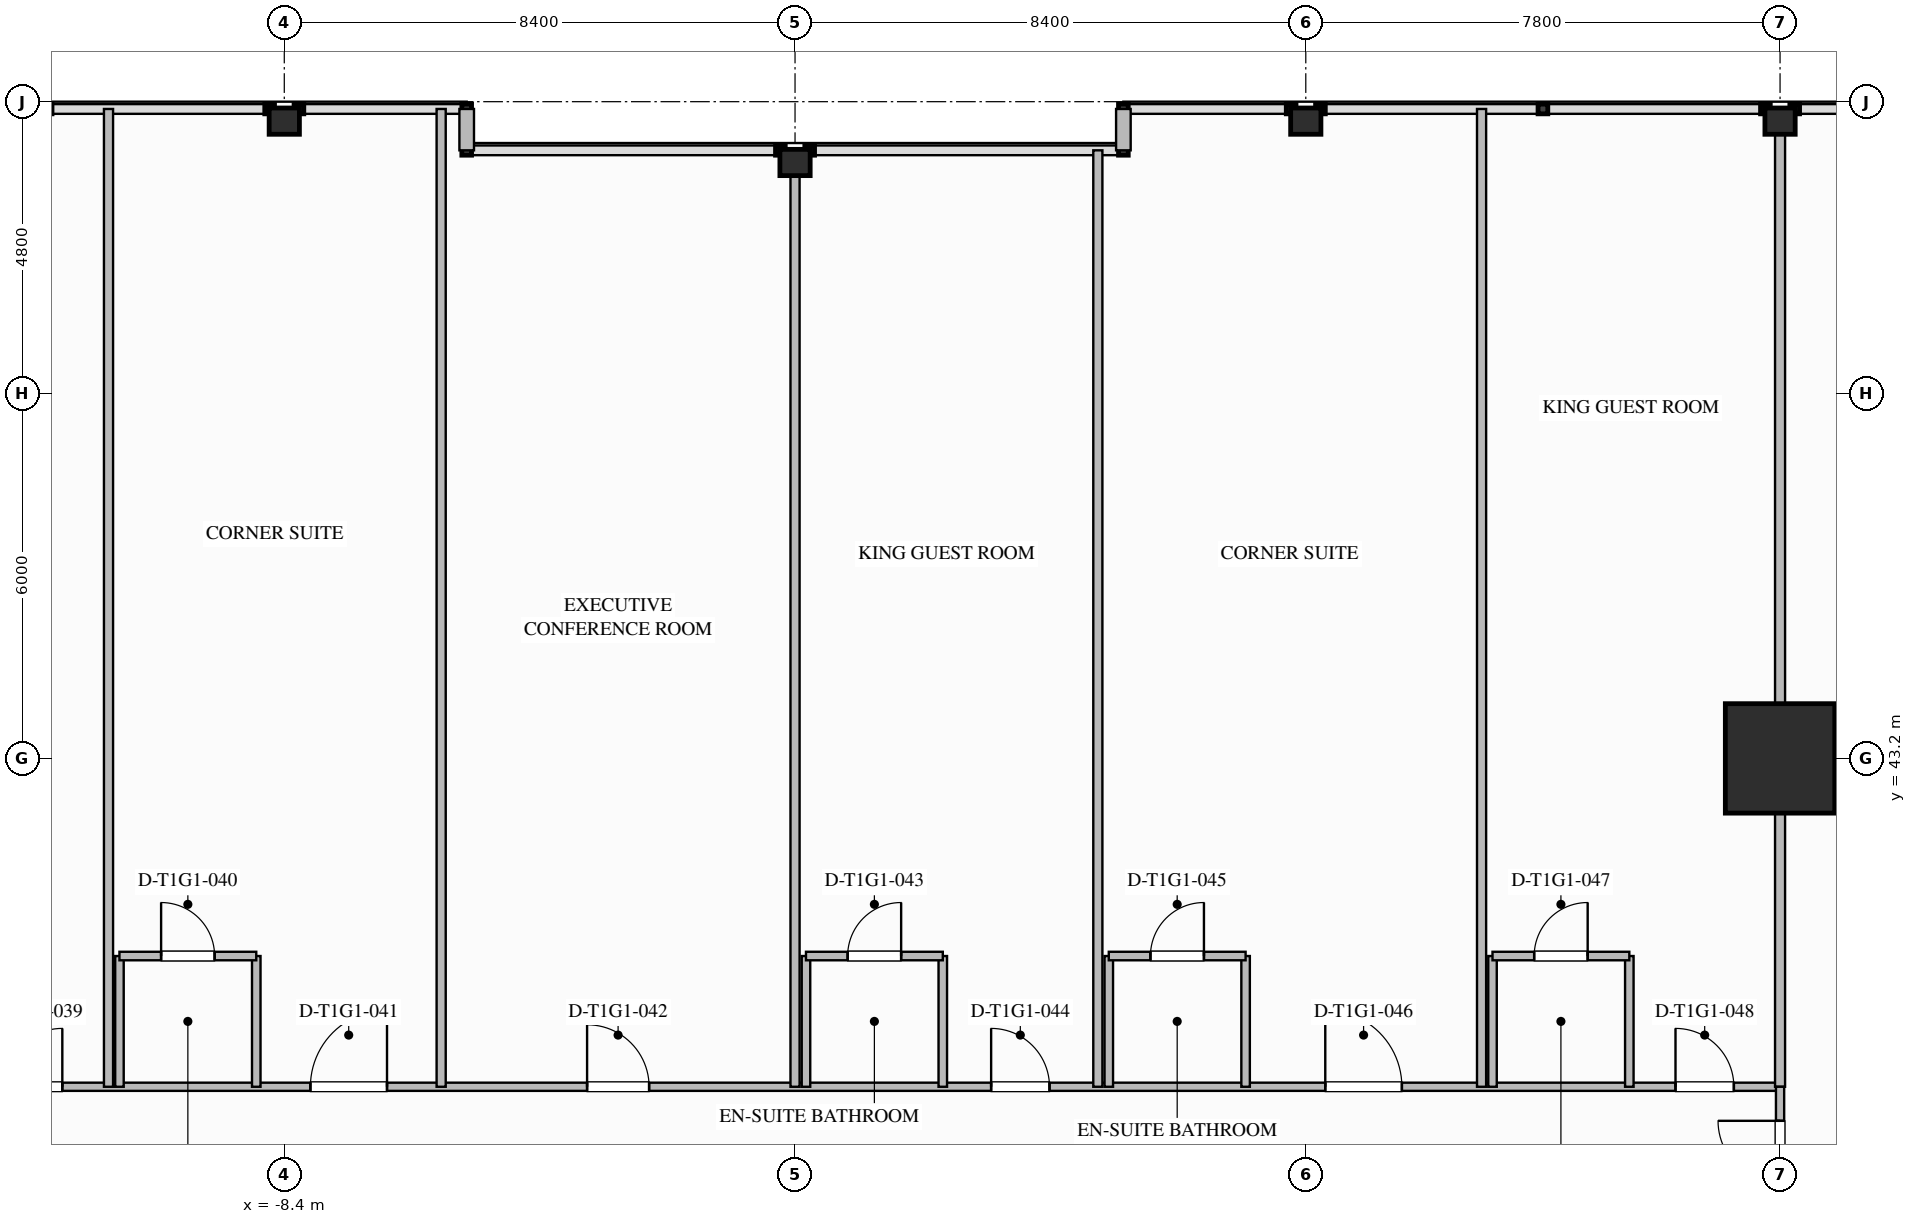
"""IFC4 building model, lengths in metres.
Left out: names, types, materials, properties, quantities, classifications, styles, units other than length and angle.
Written with IfcOpenShell. Run it as: python <this file> out.ifc"""

import sys

from ifc_helpers import new_model, si_unit, direction, frame, frame_2d, origin, origin_2d, place, context, subcontext, project, spatial, rectangle, i_section, extrude, element, fill, save


model = new_model("IFC4")
c1 = context("Model", 3, precision=1e-05, world=origin(), true_north=direction((0.0, 1.0)))
c2 = subcontext(c1, "Body", "Model", "MODEL_VIEW")
j1 = project(units=[si_unit("LENGTHUNIT", "METRE"), si_unit("PLANEANGLEUNIT", "RADIAN")], contexts=[c1])
p1 = place(None, origin())
s1 = spatial("IfcSite", under=j1, at=p1, CompositionType="ELEMENT")
p2 = place(p1, origin())
s2 = spatial("IfcBuilding", under=s1, at=p2, CompositionType="ELEMENT")
p3 = place(p2, frame((0.0, 0.0, 33.2)))
s3 = spatial("IfcBuildingStorey", under=s2, at=p3, CompositionType="ELEMENT", Elevation=33.2)
p4 = place(p3, frame((16.2, 43.2, 0.0), z_axis=(0.0, 0.0, 1.0), x_axis=(1.0, 0.0, 0.0)))
e1 = element("IfcColumn", 1, at=p4, inside=s3, PredefinedType="COLUMN", context=c2, shape_type="SweptSolid", body=[
    extrude(rectangle(XDim=1.8, YDim=1.8, at=origin_2d()), origin(), (0.0, 0.0, 1.0), 3.5),
])
for number, where, z_axis, x_axis in (
    (2, (-8.4, 53.68, -0.26), (0.0, 0.0, 1.0), (0.0, 1.0, 0.0)),
    (3, (0.0, 53.0, -0.26), (0.0, 0.0, 1.0), (0.0, 1.0, 0.0)),
    (4, (8.4, 53.68, -0.26), (0.0, 0.0, 1.0), (0.0, 1.0, 0.0)),
    (5, (16.2, 53.68, -0.26), (0.0, 0.0, 1.0), (0.0, 1.0, 0.0)),
):
    element("IfcColumn", number, at=place(p3, frame(where, z_axis=z_axis, x_axis=x_axis)), inside=s3, PredefinedType="COLUMN", context=c2, shape_type="SweptSolid", body=[
        extrude(i_section(OverallWidth=0.432, OverallDepth=0.498, WebThickness=0.056, FlangeThickness=0.089, FilletRadius=0.03, at=origin_2d()), origin(), (0.0, 0.0, 1.0), 3.757),
    ])
for number, where, z_axis, x_axis in (
    (6, (-5.4, 53.88, 0.0), (0.0, 0.0, 1.0), (0.0, -1.0, 0.0)),
    (7, (5.4, 53.2, 0.0), (0.0, 0.0, 1.0), (0.0, 1.0, 0.0)),
):
    element("IfcWall", number, at=place(p3, frame(where, z_axis=z_axis, x_axis=x_axis)), inside=s3, PredefinedType="STANDARD", context=c2, shape_type="SweptSolid", body=[
        extrude(rectangle(XDim=0.68, YDim=0.24, at=frame_2d((0.34, 0.0))), origin(), (0.0, 0.0, 1.0), 3.24),
    ])
p5 = place(p3, frame((-16.2, 37.8, 0.0), z_axis=(0.0, 0.0, 1.0), x_axis=(1.0, 0.0, 0.0)))
e8 = element("IfcWall", 8, at=p5, inside=s3, PredefinedType="PARTITIONING", context=c2, shape_type="SweptSolid", body=[
    extrude(rectangle(XDim=32.4, YDim=0.135, at=frame_2d((16.2, 0.0))), origin(), (0.0, 0.0, 1.0), 3.24),
])
p6 = place(p5, frame((3.189, 0.0, 0.0)))
e9 = element("IfcOpeningElement", 9, at=p6, cuts=e8, PredefinedType="OPENING", context=c2, shape_type="SweptSolid", body=[
    extrude(rectangle(XDim=0.96, YDim=2.15, at=frame_2d((0.48, 1.075))), frame((0.0, 0.077, 0.0), z_axis=(0.0, -1.0, 0.0), x_axis=(1.0, 0.0, 0.0)), (0.0, 0.0, 1.0), 0.155),
])
p7 = place(p5, frame((8.229, 0.0, 0.0)))
e10 = element("IfcOpeningElement", 10, at=p7, cuts=e8, PredefinedType="OPENING", context=c2, shape_type="SweptSolid", body=[
    extrude(rectangle(XDim=1.26, YDim=2.2, at=frame_2d((0.63, 1.1))), frame((0.0, 0.077, 0.0), z_axis=(0.0, -1.0, 0.0), x_axis=(1.0, 0.0, 0.0)), (0.0, 0.0, 1.0), 0.155),
])
p8 = place(p5, frame((12.78, 0.0, 0.0)))
e11 = element("IfcOpeningElement", 11, at=p8, cuts=e8, PredefinedType="OPENING", context=c2, shape_type="SweptSolid", body=[
    extrude(rectangle(XDim=1.02, YDim=2.15, at=frame_2d((0.51, 1.075))), frame((0.0, 0.077, 0.0), z_axis=(0.0, -1.0, 0.0), x_axis=(1.0, 0.0, 0.0)), (0.0, 0.0, 1.0), 0.155),
])
p9 = place(p5, frame((19.425, 0.0, 0.0)))
e12 = element("IfcOpeningElement", 12, at=p9, cuts=e8, PredefinedType="OPENING", context=c2, shape_type="SweptSolid", body=[
    extrude(rectangle(XDim=0.96, YDim=2.15, at=frame_2d((0.48, 1.075))), frame((0.0, 0.077, 0.0), z_axis=(0.0, -1.0, 0.0), x_axis=(1.0, 0.0, 0.0)), (0.0, 0.0, 1.0), 0.155),
])
p10 = place(p5, frame((24.92, 0.0, 0.0)))
e13 = element("IfcOpeningElement", 13, at=p10, cuts=e8, PredefinedType="OPENING", context=c2, shape_type="SweptSolid", body=[
    extrude(rectangle(XDim=1.26, YDim=2.2, at=frame_2d((0.63, 1.1))), frame((0.0, 0.077, 0.0), z_axis=(0.0, -1.0, 0.0), x_axis=(1.0, 0.0, 0.0)), (0.0, 0.0, 1.0), 0.155),
])
p11 = place(p5, frame((30.68, 0.0, 0.0)))
e14 = element("IfcOpeningElement", 14, at=p11, cuts=e8, PredefinedType="OPENING", context=c2, shape_type="SweptSolid", body=[
    extrude(rectangle(XDim=0.96, YDim=2.15, at=frame_2d((0.48, 1.075))), frame((0.0, 0.077, 0.0), z_axis=(0.0, -1.0, 0.0), x_axis=(1.0, 0.0, 0.0)), (0.0, 0.0, 1.0), 0.155),
])
p12 = place(p3, frame((16.2, 37.8, 0.0), z_axis=(0.0, 0.0, 1.0), x_axis=(0.0, 1.0, 0.0)))
e15 = element("IfcWall", 15, at=p12, inside=s3, PredefinedType="PARTITIONING", context=c2, shape_type="SweptSolid", body=[
    extrude(rectangle(XDim=16.08, YDim=0.165, at=frame_2d((8.04, 0.0))), origin(), (0.0, 0.0, 1.0), 2.298),
])
p13 = place(p3, frame((16.2, 35.7, 0.0), z_axis=(0.0, 0.0, 1.0), x_axis=(0.0, 1.0, 0.0)))
e16 = element("IfcWall", 16, at=p13, inside=s3, PredefinedType="PARTITIONING", context=c2, shape_type="SweptSolid", body=[
    extrude(rectangle(XDim=2.1, YDim=0.135, at=frame_2d((1.05, 0.0))), origin(), (0.0, 0.0, 1.0), 2.298),
])
p14 = place(p13, frame((0.52, 0.0, 0.0)))
e17 = element("IfcOpeningElement", 17, at=p14, cuts=e16, PredefinedType="OPENING", context=c2, shape_type="SweptSolid", body=[
    extrude(rectangle(XDim=1.02, YDim=2.15, at=frame_2d((0.51, 1.075))), frame((0.0, 0.077, 0.0), z_axis=(0.0, -1.0, 0.0), x_axis=(1.0, 0.0, 0.0)), (0.0, 0.0, 1.0), 0.155),
])
p15 = place(p3, frame((-11.291, 37.8, 0.0), z_axis=(0.0, 0.0, 1.0), x_axis=(0.0, 1.0, 0.0)))
e18 = element("IfcWall", 18, at=p15, inside=s3, PredefinedType="PARTITIONING", context=c2, shape_type="SweptSolid", body=[
    extrude(rectangle(XDim=16.08, YDim=0.15, at=frame_2d((8.04, 0.0))), origin(), (0.0, 0.0, 1.0), 3.24),
])
for number, where, z_axis, x_axis in (
    (19, (-11.111, 37.8, 0.0), (0.0, 0.0, 1.0), (0.0, 1.0, 0.0)),
    (20, (-8.861, 37.8, 0.0), (0.0, 0.0, 1.0), (0.0, 1.0, 0.0)),
):
    element("IfcWall", number, at=place(p3, frame(where, z_axis=z_axis, x_axis=x_axis)), inside=s3, PredefinedType="PLUMBINGWALL", context=c2, shape_type="SweptSolid", body=[
        extrude(rectangle(XDim=2.15, YDim=0.14, at=frame_2d((1.075, 0.0))), origin(), (0.0, 0.0, 1.0), 3.24),
    ])
p16 = place(p3, frame((-11.111, 39.95, 0.0), z_axis=(0.0, 0.0, 1.0), x_axis=(1.0, 0.0, 0.0)))
e21 = element("IfcWall", 21, at=p16, inside=s3, PredefinedType="PLUMBINGWALL", context=c2, shape_type="SweptSolid", body=[
    extrude(rectangle(XDim=2.25, YDim=0.14, at=frame_2d((1.125, 0.0))), origin(), (0.0, 0.0, 1.0), 3.24),
])
p17 = place(p16, frame((0.685, 0.0, 0.0)))
e22 = element("IfcOpeningElement", 22, at=p17, cuts=e21, PredefinedType="OPENING", context=c2, shape_type="SweptSolid", body=[
    extrude(rectangle(XDim=0.88, YDim=2.1, at=frame_2d((0.44, 1.05))), frame((0.0, 0.08, 0.0), z_axis=(0.0, -1.0, 0.0), x_axis=(1.0, 0.0, 0.0)), (0.0, 0.0, 1.0), 0.16),
])
p18 = place(p3, frame((-5.82, 37.8, 0.0), z_axis=(0.0, 0.0, 1.0), x_axis=(0.0, 1.0, 0.0)))
e23 = element("IfcWall", 23, at=p18, inside=s3, PredefinedType="PARTITIONING", context=c2, shape_type="SweptSolid", body=[
    extrude(rectangle(XDim=16.08, YDim=0.15, at=frame_2d((8.04, 0.0))), origin(), (0.0, 0.0, 1.0), 3.24),
])
p19 = place(p3, frame((0.0, 37.8, 0.0), z_axis=(0.0, 0.0, 1.0), x_axis=(0.0, 1.0, 0.0)))
e24 = element("IfcWall", 24, at=p19, inside=s3, PredefinedType="PARTITIONING", context=c2, shape_type="SweptSolid", body=[
    extrude(rectangle(XDim=15.4, YDim=0.15, at=frame_2d((7.7, 0.0))), origin(), (0.0, 0.0, 1.0), 2.298),
])
p20 = place(p3, frame((0.18, 37.8, 0.0), z_axis=(0.0, 0.0, 1.0), x_axis=(0.0, 1.0, 0.0)))
e25 = element("IfcWall", 25, at=p20, inside=s3, PredefinedType="PLUMBINGWALL", context=c2, shape_type="SweptSolid", body=[
    extrude(rectangle(XDim=2.15, YDim=0.14, at=frame_2d((1.075, 0.0))), origin(), (0.0, 0.0, 1.0), 2.617),
])
p21 = place(p3, frame((2.43, 37.8, 0.0), z_axis=(0.0, 0.0, 1.0), x_axis=(0.0, 1.0, 0.0)))
e26 = element("IfcWall", 26, at=p21, inside=s3, PredefinedType="PLUMBINGWALL", context=c2, shape_type="SweptSolid", body=[
    extrude(rectangle(XDim=2.15, YDim=0.14, at=frame_2d((1.075, 0.0))), origin(), (0.0, 0.0, 1.0), 3.24),
])
p22 = place(p3, frame((0.18, 39.95, 0.0), z_axis=(0.0, 0.0, 1.0), x_axis=(1.0, 0.0, 0.0)))
e27 = element("IfcWall", 27, at=p22, inside=s3, PredefinedType="PLUMBINGWALL", context=c2, shape_type="SweptSolid", body=[
    extrude(rectangle(XDim=2.25, YDim=0.14, at=frame_2d((1.125, 0.0))), origin(), (0.0, 0.0, 1.0), 3.24),
])
p23 = place(p22, frame((0.685, 0.0, 0.0)))
e28 = element("IfcOpeningElement", 28, at=p23, cuts=e27, PredefinedType="OPENING", context=c2, shape_type="SweptSolid", body=[
    extrude(rectangle(XDim=0.88, YDim=2.1, at=frame_2d((0.44, 1.05))), frame((0.0, 0.08, 0.0), z_axis=(0.0, -1.0, 0.0), x_axis=(1.0, 0.0, 0.0)), (0.0, 0.0, 1.0), 0.16),
])
p24 = place(p3, frame((4.98, 37.8, 0.0), z_axis=(0.0, 0.0, 1.0), x_axis=(0.0, 1.0, 0.0)))
e29 = element("IfcWall", 29, at=p24, inside=s3, PredefinedType="PARTITIONING", context=c2, shape_type="SweptSolid", body=[
    extrude(rectangle(XDim=15.4, YDim=0.15, at=frame_2d((7.7, 0.0))), origin(), (0.0, 0.0, 1.0), 3.24),
])
for number, where, z_axis, x_axis in (
    (30, (5.16, 37.8, 0.0), (0.0, 0.0, 1.0), (0.0, 1.0, 0.0)),
    (31, (7.41, 37.8, 0.0), (0.0, 0.0, 1.0), (0.0, 1.0, 0.0)),
):
    element("IfcWall", number, at=place(p3, frame(where, z_axis=z_axis, x_axis=x_axis)), inside=s3, PredefinedType="PLUMBINGWALL", context=c2, shape_type="SweptSolid", body=[
        extrude(rectangle(XDim=2.15, YDim=0.14, at=frame_2d((1.075, 0.0))), origin(), (0.0, 0.0, 1.0), 3.24),
    ])
p25 = place(p3, frame((5.16, 39.95, 0.0), z_axis=(0.0, 0.0, 1.0), x_axis=(1.0, 0.0, 0.0)))
e32 = element("IfcWall", 32, at=p25, inside=s3, PredefinedType="PLUMBINGWALL", context=c2, shape_type="SweptSolid", body=[
    extrude(rectangle(XDim=2.25, YDim=0.14, at=frame_2d((1.125, 0.0))), origin(), (0.0, 0.0, 1.0), 3.24),
])
p26 = place(p25, frame((0.685, 0.0, 0.0)))
e33 = element("IfcOpeningElement", 33, at=p26, cuts=e32, PredefinedType="OPENING", context=c2, shape_type="SweptSolid", body=[
    extrude(rectangle(XDim=0.88, YDim=2.1, at=frame_2d((0.44, 1.05))), frame((0.0, 0.08, 0.0), z_axis=(0.0, -1.0, 0.0), x_axis=(1.0, 0.0, 0.0)), (0.0, 0.0, 1.0), 0.16),
])
p27 = place(p3, frame((11.291, 37.8, 0.0), z_axis=(0.0, 0.0, 1.0), x_axis=(0.0, 1.0, 0.0)))
e34 = element("IfcWall", 34, at=p27, inside=s3, PredefinedType="PARTITIONING", context=c2, shape_type="SweptSolid", body=[
    extrude(rectangle(XDim=16.08, YDim=0.15, at=frame_2d((8.04, 0.0))), origin(), (0.0, 0.0, 1.0), 3.24),
])
for number, where, z_axis, x_axis in (
    (35, (11.471, 37.8, 0.0), (0.0, 0.0, 1.0), (0.0, 1.0, 0.0)),
    (36, (13.721, 37.8, 0.0), (0.0, 0.0, 1.0), (0.0, 1.0, 0.0)),
):
    element("IfcWall", number, at=place(p3, frame(where, z_axis=z_axis, x_axis=x_axis)), inside=s3, PredefinedType="PLUMBINGWALL", context=c2, shape_type="SweptSolid", body=[
        extrude(rectangle(XDim=2.15, YDim=0.14, at=frame_2d((1.075, 0.0))), origin(), (0.0, 0.0, 1.0), 3.24),
    ])
p28 = place(p3, frame((11.471, 39.95, 0.0), z_axis=(0.0, 0.0, 1.0), x_axis=(1.0, 0.0, 0.0)))
e37 = element("IfcWall", 37, at=p28, inside=s3, PredefinedType="PLUMBINGWALL", context=c2, shape_type="SweptSolid", body=[
    extrude(rectangle(XDim=2.25, YDim=0.14, at=frame_2d((1.125, 0.0))), origin(), (0.0, 0.0, 1.0), 3.24),
])
p29 = place(p28, frame((0.685, 0.0, 0.0)))
e38 = element("IfcOpeningElement", 38, at=p29, cuts=e37, PredefinedType="OPENING", context=c2, shape_type="SweptSolid", body=[
    extrude(rectangle(XDim=0.88, YDim=2.1, at=frame_2d((0.44, 1.05))), frame((0.0, 0.08, 0.0), z_axis=(0.0, -1.0, 0.0), x_axis=(1.0, 0.0, 0.0)), (0.0, 0.0, 1.0), 0.16),
])
p30 = place(p14, origin())
e39 = element("IfcDoor", 39, at=p30, inside=s3, OperationType="SINGLE_SWING_RIGHT", PredefinedType="DOOR", context=c2, shape_type="SweptSolid", body=[
    extrude(rectangle(XDim=1.02, YDim=2.15, at=frame_2d((0.51, 1.075))), frame((0.0, 0.025, 0.0), z_axis=(0.0, -1.0, 0.0), x_axis=(1.0, 0.0, 0.0)), (0.0, 0.0, 1.0), 0.05),
])
fill(e17, e39)
p31 = place(p6, origin())
e40 = element("IfcDoor", 40, at=p31, inside=s3, OperationType="SINGLE_SWING_RIGHT", PredefinedType="DOOR", context=c2, shape_type="SweptSolid", body=[
    extrude(rectangle(XDim=0.96, YDim=2.15, at=frame_2d((0.48, 1.075))), frame((0.0, 0.025, 0.0), z_axis=(0.0, -1.0, 0.0), x_axis=(1.0, 0.0, 0.0)), (0.0, 0.0, 1.0), 0.05),
])
fill(e9, e40)
p32 = place(p17, origin())
e41 = element("IfcDoor", 41, at=p32, inside=s3, OperationType="SINGLE_SWING_LEFT", PredefinedType="DOOR", context=c2, shape_type="SweptSolid", body=[
    extrude(rectangle(XDim=0.88, YDim=2.1, at=frame_2d((0.44, 1.05))), frame((0.0, 0.025, 0.0), z_axis=(0.0, -1.0, 0.0), x_axis=(1.0, 0.0, 0.0)), (0.0, 0.0, 1.0), 0.05),
])
fill(e22, e41)
p33 = place(p7, origin())
e42 = element("IfcDoor", 42, at=p33, inside=s3, OperationType="SINGLE_SWING_RIGHT", PredefinedType="DOOR", context=c2, shape_type="SweptSolid", body=[
    extrude(rectangle(XDim=1.26, YDim=2.2, at=frame_2d((0.63, 1.1))), frame((0.0, 0.025, 0.0), z_axis=(0.0, -1.0, 0.0), x_axis=(1.0, 0.0, 0.0)), (0.0, 0.0, 1.0), 0.05),
])
fill(e10, e42)
p34 = place(p8, origin())
e43 = element("IfcDoor", 43, at=p34, inside=s3, OperationType="SINGLE_SWING_LEFT", PredefinedType="DOOR", context=c2, shape_type="SweptSolid", body=[
    extrude(rectangle(XDim=1.02, YDim=2.15, at=frame_2d((0.51, 1.075))), frame((0.0, 0.025, 0.0), z_axis=(0.0, -1.0, 0.0), x_axis=(1.0, 0.0, 0.0)), (0.0, 0.0, 1.0), 0.05),
])
fill(e11, e43)
p35 = place(p23, origin())
e44 = element("IfcDoor", 44, at=p35, inside=s3, OperationType="SINGLE_SWING_RIGHT", PredefinedType="DOOR", context=c2, shape_type="SweptSolid", body=[
    extrude(rectangle(XDim=0.88, YDim=2.1, at=frame_2d((0.44, 1.05))), frame((0.0, 0.025, 0.0), z_axis=(0.0, -1.0, 0.0), x_axis=(1.0, 0.0, 0.0)), (0.0, 0.0, 1.0), 0.05),
])
fill(e28, e44)
p36 = place(p9, origin())
e45 = element("IfcDoor", 45, at=p36, inside=s3, OperationType="SINGLE_SWING_LEFT", PredefinedType="DOOR", context=c2, shape_type="SweptSolid", body=[
    extrude(rectangle(XDim=0.96, YDim=2.15, at=frame_2d((0.48, 1.075))), frame((0.0, 0.025, 0.0), z_axis=(0.0, -1.0, 0.0), x_axis=(1.0, 0.0, 0.0)), (0.0, 0.0, 1.0), 0.05),
])
fill(e12, e45)
p37 = place(p26, origin())
e46 = element("IfcDoor", 46, at=p37, inside=s3, OperationType="SINGLE_SWING_RIGHT", PredefinedType="DOOR", context=c2, shape_type="SweptSolid", body=[
    extrude(rectangle(XDim=0.88, YDim=2.1, at=frame_2d((0.44, 1.05))), frame((0.0, 0.025, 0.0), z_axis=(0.0, -1.0, 0.0), x_axis=(1.0, 0.0, 0.0)), (0.0, 0.0, 1.0), 0.05),
])
fill(e33, e46)
p38 = place(p10, origin())
e47 = element("IfcDoor", 47, at=p38, inside=s3, OperationType="SINGLE_SWING_LEFT", PredefinedType="DOOR", context=c2, shape_type="SweptSolid", body=[
    extrude(rectangle(XDim=1.26, YDim=2.2, at=frame_2d((0.63, 1.1))), frame((0.0, 0.025, 0.0), z_axis=(0.0, -1.0, 0.0), x_axis=(1.0, 0.0, 0.0)), (0.0, 0.0, 1.0), 0.05),
])
fill(e13, e47)
p39 = place(p29, origin())
e48 = element("IfcDoor", 48, at=p39, inside=s3, OperationType="SINGLE_SWING_RIGHT", PredefinedType="DOOR", context=c2, shape_type="SweptSolid", body=[
    extrude(rectangle(XDim=0.88, YDim=2.1, at=frame_2d((0.44, 1.05))), frame((0.0, 0.025, 0.0), z_axis=(0.0, -1.0, 0.0), x_axis=(1.0, 0.0, 0.0)), (0.0, 0.0, 1.0), 0.05),
])
fill(e38, e48)
p40 = place(p11, origin())
e49 = element("IfcDoor", 49, at=p40, inside=s3, OperationType="SINGLE_SWING_LEFT", PredefinedType="DOOR", context=c2, shape_type="SweptSolid", body=[
    extrude(rectangle(XDim=0.96, YDim=2.15, at=frame_2d((0.48, 1.075))), frame((0.0, 0.025, 0.0), z_axis=(0.0, -1.0, 0.0), x_axis=(1.0, 0.0, 0.0)), (0.0, 0.0, 1.0), 0.05),
])
fill(e14, e49)
save(model, sys.argv[1])
